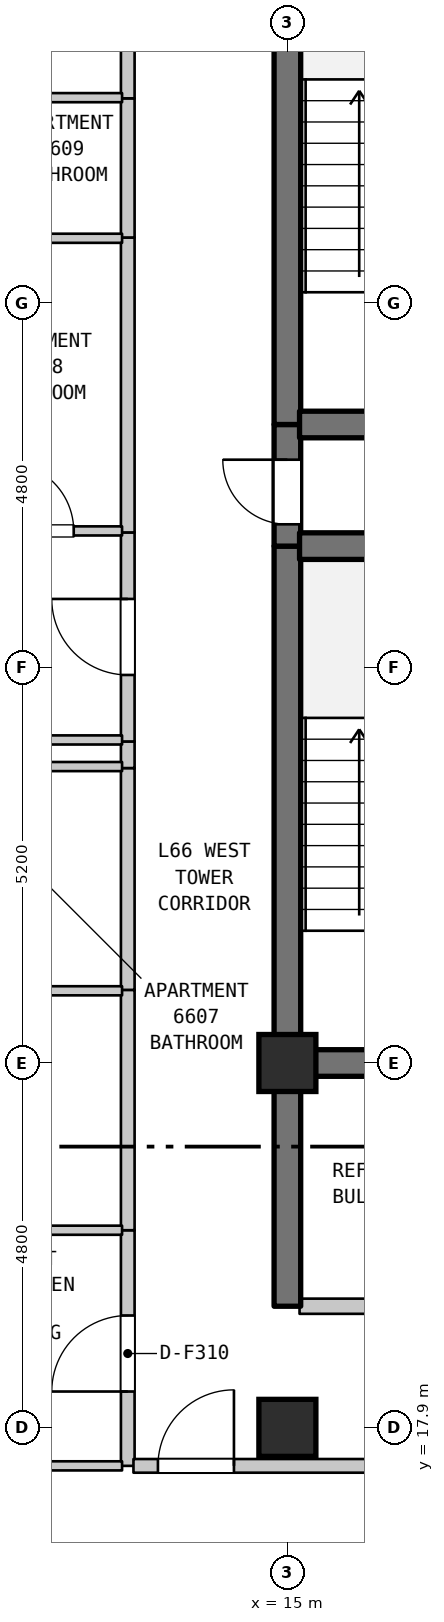
"""IFC4 building model, lengths in metres.
Left out: names, types, materials, properties, quantities, classifications, styles, units other than length and angle.
Written with IfcOpenShell. Run it as: python <this file> out.ifc"""

import sys

from ifc_helpers import new_model, si_unit, direction, frame, frame_2d, origin, origin_2d, place, context, subcontext, project, spatial, rectangle, extrude, element, fill, save


model = new_model("IFC4")
c1 = context("Model", 3, precision=1e-05, world=origin(), true_north=direction((0.0, 1.0)))
c2 = subcontext(c1, "Body", "Model", "MODEL_VIEW")
j1 = project(units=[si_unit("LENGTHUNIT", "METRE"), si_unit("PLANEANGLEUNIT", "RADIAN")], contexts=[c1])
p1 = place(None, origin())
s1 = spatial("IfcSite", under=j1, at=p1, CompositionType="ELEMENT")
p2 = place(p1, origin())
s2 = spatial("IfcBuilding", under=s1, at=p2, CompositionType="ELEMENT")
p3 = place(p2, frame((0.0, 0.0, 265.8)))
s3 = spatial("IfcBuildingStorey", under=s2, at=p3, CompositionType="ELEMENT", Elevation=265.8)
for number, where, z_axis, x_axis in (
    (1, (15.0, 17.9, 0.0), (0.0, 0.0, 1.0), (1.0, 0.0, 0.0)),
    (2, (15.0, 22.7, 0.0), (0.0, 0.0, 1.0), (1.0, 0.0, 0.0)),
):
    element("IfcColumn", number, at=place(p3, frame(where, z_axis=z_axis, x_axis=x_axis)), inside=s3, PredefinedType="COLUMN", context=c2, shape_type="SweptSolid", body=[
        extrude(rectangle(XDim=0.75, YDim=0.75, at=origin_2d()), origin(), (0.0, 0.0, 1.0), 3.7),
    ])
p4 = place(p3, frame((12.9, 17.4, 0.0), z_axis=(0.0, 0.0, 1.0), x_axis=(0.0, 1.0, 0.0)))
e3 = element("IfcWall", 3, at=p4, inside=s3, PredefinedType="STANDARD", context=c2, shape_type="SweptSolid", body=[
    extrude(rectangle(XDim=3.1, YDim=0.18, at=frame_2d((1.55, 0.0))), origin(), (0.0, 0.0, 1.0), 3.39),
])
p5 = place(p4, frame((0.978, 0.0, 0.0)))
e4 = element("IfcOpeningElement", 4, at=p5, cuts=e3, PredefinedType="OPENING", context=c2, shape_type="SweptSolid", body=[
    extrude(rectangle(XDim=1.0, YDim=2.15, at=frame_2d((0.5, 1.075))), frame((0.0, 0.1, 0.0), z_axis=(0.0, -1.0, 0.0), x_axis=(1.0, 0.0, 0.0)), (0.0, 0.0, 1.0), 0.2),
])
p6 = place(p3, frame((12.9, 20.5, 0.0), z_axis=(0.0, 0.0, 1.0), x_axis=(0.0, 1.0, 0.0)))
e5 = element("IfcWall", 5, at=p6, inside=s3, PredefinedType="STANDARD", context=c2, shape_type="SweptSolid", body=[
    extrude(rectangle(XDim=3.162, YDim=0.18, at=frame_2d((1.581, 0.0))), origin(), (0.0, 0.0, 1.0), 3.39),
])
p7 = place(p3, frame((12.9, 23.662, 0.0), z_axis=(0.0, 0.0, 1.0), x_axis=(0.0, 1.0, 0.0)))
e6 = element("IfcWall", 6, at=p7, inside=s3, PredefinedType="STANDARD", context=c2, shape_type="SweptSolid", body=[
    extrude(rectangle(XDim=2.918, YDim=0.18, at=frame_2d((1.459, 0.0))), origin(), (0.0, 0.0, 1.0), 3.39),
])
p8 = place(p3, frame((12.9, 26.58, 0.0), z_axis=(0.0, 0.0, 1.0), x_axis=(0.0, 1.0, 0.0)))
e7 = element("IfcWall", 7, at=p8, inside=s3, PredefinedType="STANDARD", context=c2, shape_type="SweptSolid", body=[
    extrude(rectangle(XDim=0.35, YDim=0.18, at=frame_2d((0.175, 0.0))), origin(), (0.0, 0.0, 1.0), 3.39),
])
p9 = place(p3, frame((12.9, 26.93, 0.0), z_axis=(0.0, 0.0, 1.0), x_axis=(0.0, 1.0, 0.0)))
e8 = element("IfcWall", 8, at=p9, inside=s3, PredefinedType="STANDARD", context=c2, shape_type="SweptSolid", body=[
    extrude(rectangle(XDim=2.75, YDim=0.18, at=frame_2d((1.375, 0.0))), origin(), (0.0, 0.0, 1.0), 3.39),
])
p10 = place(p9, frame((0.875, 0.0, 0.0)))
e9 = element("IfcOpeningElement", 9, at=p10, cuts=e8, PredefinedType="OPENING", context=c2, shape_type="SweptSolid", body=[
    extrude(rectangle(XDim=1.0, YDim=2.15, at=frame_2d((0.5, 1.075))), frame((0.0, 0.1, 0.0), z_axis=(0.0, -1.0, 0.0), x_axis=(1.0, 0.0, 0.0)), (0.0, 0.0, 1.0), 0.2),
])
p11 = place(p3, frame((12.9, 29.68, 0.0), z_axis=(0.0, 0.0, 1.0), x_axis=(0.0, 1.0, 0.0)))
e10 = element("IfcWall", 10, at=p11, inside=s3, PredefinedType="STANDARD", context=c2, shape_type="SweptSolid", body=[
    extrude(rectangle(XDim=3.88, YDim=0.18, at=frame_2d((1.94, 0.0))), origin(), (0.0, 0.0, 1.0), 3.39),
])
p12 = place(p3, frame((12.9, 33.56, 0.0), z_axis=(0.0, 0.0, 1.0), x_axis=(0.0, 1.0, 0.0)))
e11 = element("IfcWall", 11, at=p12, inside=s3, PredefinedType="STANDARD", context=c2, shape_type="SweptSolid", body=[
    extrude(rectangle(XDim=1.831, YDim=0.18, at=frame_2d((0.916, 0.0))), origin(), (0.0, 0.0, 1.0), 3.39),
])
p13 = place(p3, frame((12.9, 35.391, 0.0), z_axis=(0.0, 0.0, 1.0), x_axis=(0.0, 1.0, 0.0)))
e12 = element("IfcWall", 12, at=p13, inside=s3, PredefinedType="STANDARD", context=c2, shape_type="SweptSolid", body=[
    extrude(rectangle(XDim=1.831, YDim=0.18, at=frame_2d((0.916, 0.0))), origin(), (0.0, 0.0, 1.0), 3.39),
])
p14 = place(p3, frame((15.0, 19.5, 0.0), z_axis=(0.0, 0.0, 1.0), x_axis=(0.0, 1.0, 0.0)))
e13 = element("IfcWall", 13, at=p14, inside=s3, PredefinedType="SHEAR", context=c2, shape_type="SweptSolid", body=[
    extrude(rectangle(XDim=3.2, YDim=0.35, at=frame_2d((1.6, 0.0))), origin(), (0.0, 0.0, 1.0), 3.39),
])
p15 = place(p3, frame((15.0, 22.7, 0.0), z_axis=(0.0, 0.0, 1.0), x_axis=(0.0, 1.0, 0.0)))
e14 = element("IfcWall", 14, at=p15, inside=s3, PredefinedType="SHEAR", context=c2, shape_type="SweptSolid", body=[
    extrude(rectangle(XDim=6.8, YDim=0.35, at=frame_2d((3.4, 0.0))), origin(), (0.0, 0.0, 1.0), 3.39),
])
p16 = place(p3, frame((15.0, 29.5, 0.0), z_axis=(0.0, 0.0, 1.0), x_axis=(0.0, 1.0, 0.0)))
e15 = element("IfcWall", 15, at=p16, inside=s3, PredefinedType="SHEAR", context=c2, shape_type="SweptSolid", body=[
    extrude(rectangle(XDim=1.6, YDim=0.35, at=frame_2d((0.8, 0.0))), origin(), (0.0, 0.0, 1.0), 3.39),
])
p17 = place(p16, frame((0.287, 0.0, 0.0)))
e16 = element("IfcOpeningElement", 16, at=p17, cuts=e15, PredefinedType="OPENING", context=c2, shape_type="SweptSolid", body=[
    extrude(rectangle(XDim=0.85, YDim=2.1, at=frame_2d((0.425, 1.05))), frame((0.0, 0.185, 0.0), z_axis=(0.0, -1.0, 0.0), x_axis=(1.0, 0.0, 0.0)), (0.0, 0.0, 1.0), 0.37),
])
p18 = place(p3, frame((15.0, 31.1, 0.0), z_axis=(0.0, 0.0, 1.0), x_axis=(0.0, 1.0, 0.0)))
e17 = element("IfcWall", 17, at=p18, inside=s3, PredefinedType="SHEAR", context=c2, shape_type="SweptSolid", body=[
    extrude(rectangle(XDim=6.8, YDim=0.35, at=frame_2d((3.4, 0.0))), origin(), (0.0, 0.0, 1.0), 3.39),
])
p19 = place(p3, frame((8.973, 17.4, 0.0), z_axis=(0.0, 0.0, 1.0), x_axis=(1.0, 0.0, 0.0)))
e18 = element("IfcWall", 18, at=p19, inside=s3, PredefinedType="PARTITIONING", context=c2, shape_type="SweptSolid", body=[
    extrude(rectangle(XDim=3.852, YDim=0.12, at=frame_2d((1.926, 0.0))), origin(), (0.0, 0.0, 1.0), 3.39),
])
p20 = place(p3, frame((12.975, 17.4, 0.0), z_axis=(0.0, 0.0, 1.0), x_axis=(1.0, 0.0, 0.0)))
e19 = element("IfcWall", 19, at=p20, inside=s3, PredefinedType="STANDARD", context=c2, shape_type="SweptSolid", body=[
    extrude(rectangle(XDim=3.68, YDim=0.18, at=frame_2d((1.84, 0.0))), origin(), (0.0, 0.0, 1.0), 3.39),
])
p21 = place(p20, frame((0.322, 0.0, 0.0)))
e20 = element("IfcOpeningElement", 20, at=p21, cuts=e19, PredefinedType="OPENING", context=c2, shape_type="SweptSolid", body=[
    extrude(rectangle(XDim=1.0, YDim=2.15, at=frame_2d((0.5, 1.075))), frame((0.0, 0.1, 0.0), z_axis=(0.0, -1.0, 0.0), x_axis=(1.0, 0.0, 0.0)), (0.0, 0.0, 1.0), 0.2),
])
p22 = place(p3, frame((15.16, 19.5, 0.0), z_axis=(0.0, 0.0, 1.0), x_axis=(1.0, 0.0, 0.0)))
e21 = element("IfcWall", 21, at=p22, inside=s3, PredefinedType="STANDARD", context=c2, shape_type="SweptSolid", body=[
    extrude(rectangle(XDim=3.68, YDim=0.2, at=frame_2d((1.84, 0.0))), origin(), (0.0, 0.0, 1.0), 3.39),
])
p23 = place(p22, frame((1.39, 0.0, 0.0)))
e22 = element("IfcOpeningElement", 22, at=p23, cuts=e21, PredefinedType="OPENING", context=c2, shape_type="SweptSolid", body=[
    extrude(rectangle(XDim=0.9, YDim=2.15, at=frame_2d((0.45, 1.075))), frame((0.0, 0.11, 0.0), z_axis=(0.0, -1.0, 0.0), x_axis=(1.0, 0.0, 0.0)), (0.0, 0.0, 1.0), 0.22),
])
p24 = place(p3, frame((10.695, 20.5, 0.0), z_axis=(0.0, 0.0, 1.0), x_axis=(1.0, 0.0, 0.0)))
e23 = element("IfcWall", 23, at=p24, inside=s3, PredefinedType="PARTITIONING", context=c2, shape_type="SweptSolid", body=[
    extrude(rectangle(XDim=2.13, YDim=0.12, at=frame_2d((1.065, 0.0))), origin(), (0.0, 0.0, 1.0), 3.39),
])
p25 = place(p3, frame((15.16, 22.7, 0.0), z_axis=(0.0, 0.0, 1.0), x_axis=(1.0, 0.0, 0.0)))
e24 = element("IfcWall", 24, at=p25, inside=s3, PredefinedType="SHEAR", context=c2, shape_type="SweptSolid", body=[
    extrude(rectangle(XDim=3.68, YDim=0.35, at=frame_2d((1.84, 0.0))), origin(), (0.0, 0.0, 1.0), 3.39),
])
for number, where, z_axis, x_axis in (
    (25, (10.695, 23.65, 0.0), (0.0, 0.0, 1.0), (1.0, 0.0, 0.0)),
    (26, (10.695, 26.6, 0.0), (0.0, 0.0, 1.0), (1.0, 0.0, 0.0)),
):
    element("IfcWall", number, at=place(p3, frame(where, z_axis=z_axis, x_axis=x_axis)), inside=s3, PredefinedType="PARTITIONING", context=c2, shape_type="SweptSolid", body=[
        extrude(rectangle(XDim=2.13, YDim=0.12, at=frame_2d((1.065, 0.0))), origin(), (0.0, 0.0, 1.0), 3.39),
    ])
p26 = place(p3, frame((9.175, 26.95, 0.0), z_axis=(0.0, 0.0, 1.0), x_axis=(1.0, 0.0, 0.0)))
e27 = element("IfcWall", 27, at=p26, inside=s3, PredefinedType="PARTITIONING", context=c2, shape_type="SweptSolid", body=[
    extrude(rectangle(XDim=3.65, YDim=0.12, at=frame_2d((1.825, 0.0))), origin(), (0.0, 0.0, 1.0), 3.39),
])
p27 = place(p3, frame((15.16, 29.5, 0.0), z_axis=(0.0, 0.0, 1.0), x_axis=(1.0, 0.0, 0.0)))
e28 = element("IfcWall", 28, at=p27, inside=s3, PredefinedType="SHEAR", context=c2, shape_type="SweptSolid", body=[
    extrude(rectangle(XDim=3.68, YDim=0.35, at=frame_2d((1.84, 0.0))), origin(), (0.0, 0.0, 1.0), 3.39),
])
p28 = place(p3, frame((10.623, 29.7, 0.0), z_axis=(0.0, 0.0, 1.0), x_axis=(1.0, 0.0, 0.0)))
e29 = element("IfcWall", 29, at=p28, inside=s3, PredefinedType="PARTITIONING", context=c2, shape_type="SweptSolid", body=[
    extrude(rectangle(XDim=2.202, YDim=0.12, at=frame_2d((1.101, 0.0))), origin(), (0.0, 0.0, 1.0), 3.39),
])
p29 = place(p28, frame((0.666, 0.0, 0.0)))
e30 = element("IfcOpeningElement", 30, at=p29, cuts=e29, PredefinedType="OPENING", context=c2, shape_type="SweptSolid", body=[
    extrude(rectangle(XDim=0.9, YDim=2.1, at=frame_2d((0.45, 1.05))), frame((0.0, 0.07, 0.0), z_axis=(0.0, -1.0, 0.0), x_axis=(1.0, 0.0, 0.0)), (0.0, 0.0, 1.0), 0.14),
])
p30 = place(p3, frame((15.16, 31.1, 0.0), z_axis=(0.0, 0.0, 1.0), x_axis=(1.0, 0.0, 0.0)))
e31 = element("IfcWall", 31, at=p30, inside=s3, PredefinedType="SHEAR", context=c2, shape_type="SweptSolid", body=[
    extrude(rectangle(XDim=3.68, YDim=0.35, at=frame_2d((1.84, 0.0))), origin(), (0.0, 0.0, 1.0), 3.39),
])
for number, where, z_axis, x_axis in (
    (32, (10.645, 33.55, 0.0), (0.0, 0.0, 1.0), (1.0, 0.0, 0.0)),
    (33, (10.645, 35.4, 0.0), (0.0, 0.0, 1.0), (1.0, 0.0, 0.0)),
):
    element("IfcWall", number, at=place(p3, frame(where, z_axis=z_axis, x_axis=x_axis)), inside=s3, PredefinedType="PARTITIONING", context=c2, shape_type="SweptSolid", body=[
        extrude(rectangle(XDim=2.18, YDim=0.12, at=frame_2d((1.09, 0.0))), origin(), (0.0, 0.0, 1.0), 3.39),
    ])
p31 = place(p5, origin())
e34 = element("IfcDoor", 34, at=p31, inside=s3, OperationType="SINGLE_SWING_LEFT", PredefinedType="DOOR", context=c2, shape_type="SweptSolid", body=[
    extrude(rectangle(XDim=1.0, YDim=2.15, at=frame_2d((0.5, 1.075))), frame((0.0, 0.025, 0.0), z_axis=(0.0, -1.0, 0.0), x_axis=(1.0, 0.0, 0.0)), (0.0, 0.0, 1.0), 0.05),
])
fill(e4, e34)
p32 = place(p10, origin())
e35 = element("IfcDoor", 35, at=p32, inside=s3, OperationType="SINGLE_SWING_RIGHT", PredefinedType="DOOR", context=c2, shape_type="SweptSolid", body=[
    extrude(rectangle(XDim=1.0, YDim=2.15, at=frame_2d((0.5, 1.075))), frame((0.0, 0.025, 0.0), z_axis=(0.0, -1.0, 0.0), x_axis=(1.0, 0.0, 0.0)), (0.0, 0.0, 1.0), 0.05),
])
fill(e9, e35)
p33 = place(p17, origin())
e36 = element("IfcDoor", 36, at=p33, inside=s3, OperationType="SINGLE_SWING_RIGHT", PredefinedType="DOOR", context=c2, shape_type="SweptSolid", body=[
    extrude(rectangle(XDim=0.85, YDim=2.1, at=frame_2d((0.425, 1.05))), frame((0.0, 0.025, 0.0), z_axis=(0.0, -1.0, 0.0), x_axis=(1.0, 0.0, 0.0)), (0.0, 0.0, 1.0), 0.05),
])
fill(e16, e36)
p34 = place(p21, origin())
e37 = element("IfcDoor", 37, at=p34, inside=s3, OperationType="SINGLE_SWING_RIGHT", PredefinedType="DOOR", context=c2, shape_type="SweptSolid", body=[
    extrude(rectangle(XDim=1.0, YDim=2.15, at=frame_2d((0.5, 1.075))), frame((0.0, 0.025, 0.0), z_axis=(0.0, -1.0, 0.0), x_axis=(1.0, 0.0, 0.0)), (0.0, 0.0, 1.0), 0.05),
])
fill(e20, e37)
p35 = place(p29, origin())
e38 = element("IfcDoor", 38, at=p35, inside=s3, OperationType="SINGLE_SWING_LEFT", PredefinedType="DOOR", context=c2, shape_type="SweptSolid", body=[
    extrude(rectangle(XDim=0.9, YDim=2.1, at=frame_2d((0.45, 1.05))), frame((0.0, 0.025, 0.0), z_axis=(0.0, -1.0, 0.0), x_axis=(1.0, 0.0, 0.0)), (0.0, 0.0, 1.0), 0.05),
])
fill(e30, e38)
save(model, sys.argv[1])
